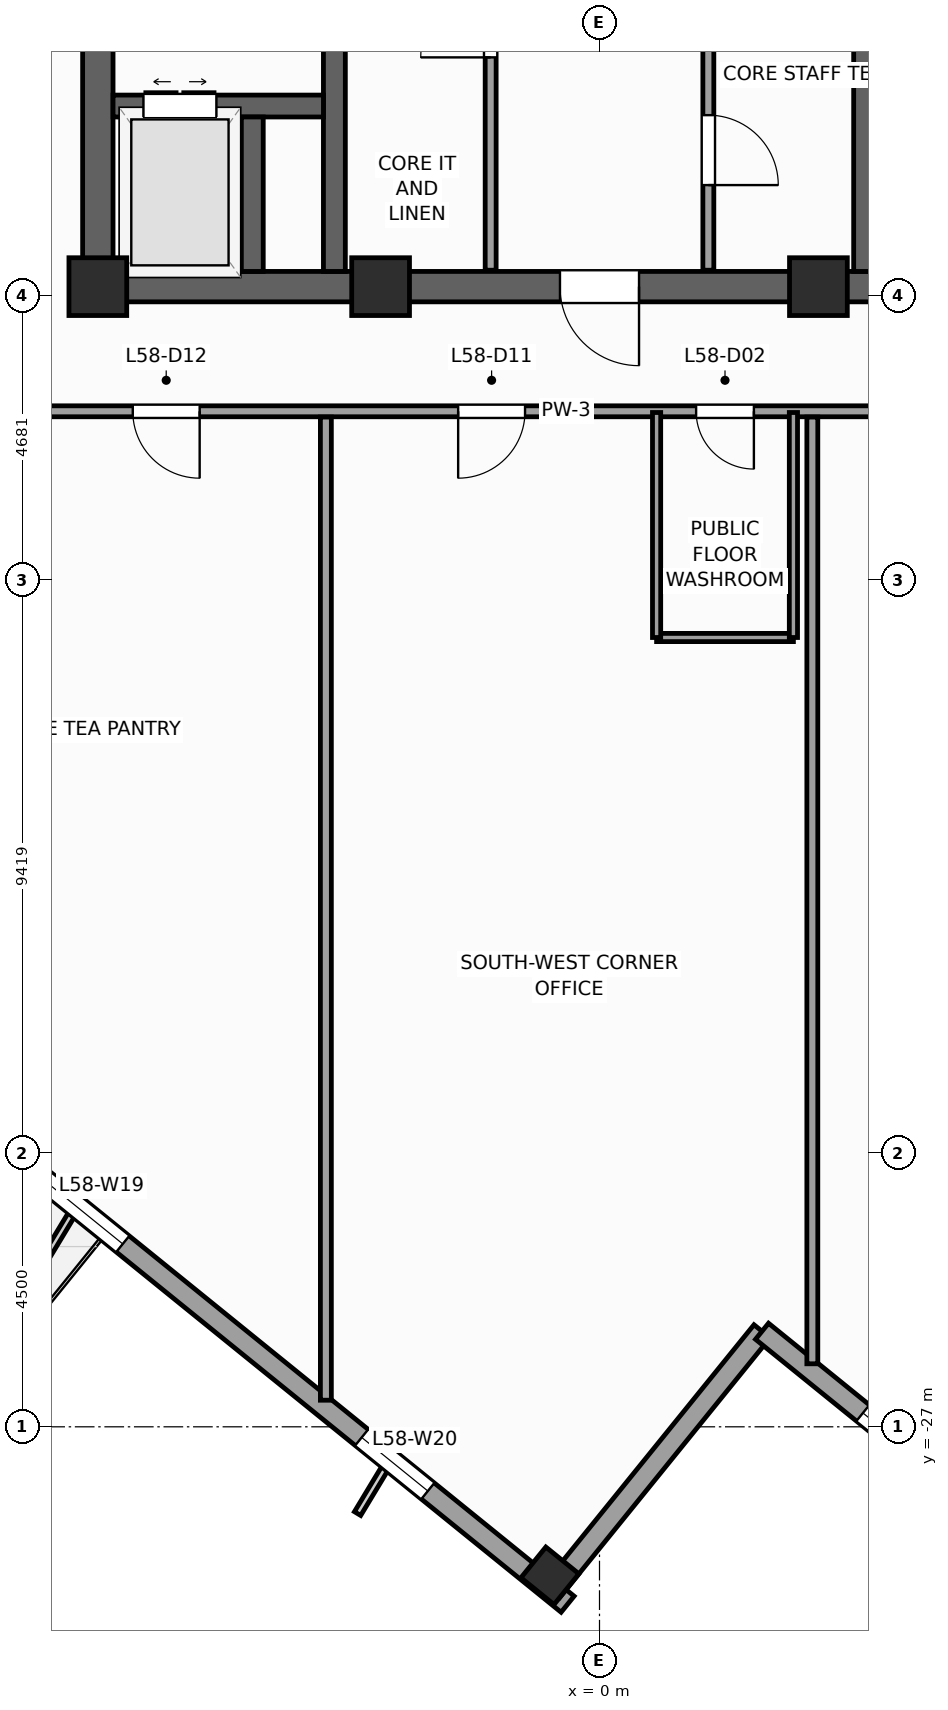
"""IFC4 building model, lengths in metres.
Left out: names, types, materials, properties, quantities, classifications, styles, units other than length and angle.
Written with IfcOpenShell. Run it as: python <this file> out.ifc"""

import sys

from ifc_helpers import new_model, si_unit, direction, frame, frame_2d, origin, origin_2d, place, context, subcontext, project, spatial, rectangle, extrude, source, transform, mapped, element, fill, save


model = new_model("IFC4")
c1 = context("Model", 3, precision=1e-05, world=origin(), true_north=direction((0.0, 1.0)))
c2 = subcontext(c1, "Body", "Model", "MODEL_VIEW")
j1 = project(units=[si_unit("LENGTHUNIT", "METRE"), si_unit("PLANEANGLEUNIT", "RADIAN")], contexts=[c1])
p1 = place(None, origin())
s1 = spatial("IfcSite", under=j1, at=p1, CompositionType="ELEMENT")
p2 = place(p1, origin())
s2 = spatial("IfcBuilding", under=s1, at=p2, CompositionType="ELEMENT")
p3 = place(p2, frame((0.0, 0.0, 240.7)))
s3 = spatial("IfcBuildingStorey", under=s2, at=p3, CompositionType="ELEMENT", Elevation=240.7)
p4 = place(p3, frame((-8.5, -8.25, 0.0), z_axis=(0.0, 0.0, 1.0), x_axis=(1.0, 0.0, 0.0)))
e1 = element("IfcWall", 1, at=p4, inside=s3, PredefinedType="SHEAR", context=c2, shape_type="SweptSolid", body=[
    extrude(rectangle(XDim=17.0, YDim=0.5, at=frame_2d((8.5, 0.0))), origin(), (0.0, 0.0, 1.0), 3.9),
])
p5 = place(p4, frame((7.85, 0.0, 0.0)))
e2 = element("IfcOpeningElement", 2, at=p5, cuts=e1, PredefinedType="OPENING", context=c2, shape_type="SweptSolid", body=[
    extrude(rectangle(XDim=1.3, YDim=2.2, at=frame_2d((0.65, 1.1))), frame((0.0, 0.26, 0.0), z_axis=(0.0, -1.0, 0.0), x_axis=(1.0, 0.0, 0.0)), (0.0, 0.0, 1.0), 0.52),
])
p6 = place(p3, frame((-8.25, -8.0, 0.0), z_axis=(0.0, 0.0, 1.0), x_axis=(0.0, 1.0, 0.0)))
e3 = element("IfcWall", 3, at=p6, inside=s3, PredefinedType="SHEAR", context=c2, shape_type="SweptSolid", body=[
    extrude(rectangle(XDim=16.0, YDim=0.5, at=frame_2d((8.0, 0.0))), origin(), (0.0, 0.0, 1.0), 3.9),
])
p7 = place(p6, frame((4.69, 0.0, 0.0)))
e4 = element("IfcOpeningElement", 4, at=p7, cuts=e3, PredefinedType="OPENING", context=c2, shape_type="SweptSolid", body=[
    extrude(rectangle(XDim=1.3, YDim=2.2, at=frame_2d((0.65, 1.1))), frame((0.0, 0.26, 0.0), z_axis=(0.0, -1.0, 0.0), x_axis=(1.0, 0.0, 0.0)), (0.0, 0.0, 1.0), 0.52),
])
for number, where, z_axis, x_axis in (
    (5, (-4.36, -8.0, 0.0), (0.0, 0.0, 1.0), (0.0, 1.0, 0.0)),
    (6, (4.36, -8.0, 0.0), (0.0, 0.0, 1.0), (0.0, 1.0, 0.0)),
):
    element("IfcWall", number, at=place(p3, frame(where, z_axis=z_axis, x_axis=x_axis)), inside=s3, PredefinedType="SHEAR", context=c2, shape_type="SweptSolid", body=[
        extrude(rectangle(XDim=16.0, YDim=0.36, at=frame_2d((8.0, 0.0))), origin(), (0.0, 0.0, 1.0), 3.9),
    ])
p8 = place(p3, frame((-8.0, -5.28, 0.0), z_axis=(0.0, 0.0, 1.0), x_axis=(1.0, 0.0, 0.0)))
e7 = element("IfcWall", 7, at=p8, inside=s3, PredefinedType="SHEAR", context=c2, shape_type="SweptSolid", body=[
    extrude(rectangle(XDim=3.46, YDim=0.36, at=frame_2d((1.73, 0.0))), origin(), (0.0, 0.0, 1.0), 3.9),
])
p9 = place(p8, frame((0.5, 0.0, 0.0)))
e8 = element("IfcOpeningElement", 8, at=p9, cuts=e7, PredefinedType="OPENING", context=c2, shape_type="SweptSolid", body=[
    extrude(rectangle(XDim=1.2, YDim=2.25, at=frame_2d((0.6, 1.125))), frame((0.0, 0.19, 0.0), z_axis=(0.0, -1.0, 0.0), x_axis=(1.0, 0.0, 0.0)), (0.0, 0.0, 1.0), 0.38),
])
p10 = place(p3, frame((-5.71, -8.0, 0.0), z_axis=(0.0, 0.0, 1.0), x_axis=(0.0, 1.0, 0.0)))
e9 = element("IfcWall", 9, at=p10, inside=s3, PredefinedType="SHEAR", context=c2, shape_type="SweptSolid", body=[
    extrude(rectangle(XDim=2.54, YDim=0.36, at=frame_2d((1.27, 0.0))), origin(), (0.0, 0.0, 1.0), 3.9),
])
m1 = source(origin(), c2, "Body", "SweptSolid", [
    extrude(rectangle(XDim=0.95, YDim=0.95, at=origin_2d()), origin(), (0.0, 0.0, 1.0), 3.9),
])
for number, where, z_axis, x_axis in (
    (10, (-8.25, -8.25, 0.0), (0.0, 0.0, 1.0), (1.0, 0.0, 0.0)),
    (11, (-3.6, -8.25, 0.0), (0.0, 0.0, 1.0), (1.0, 0.0, 0.0)),
    (12, (3.6, -8.25, 0.0), (0.0, 0.0, 1.0), (1.0, 0.0, 0.0)),
):
    element("IfcColumn", number, at=place(p3, frame(where, z_axis=z_axis, x_axis=x_axis)), inside=s3, PredefinedType="PILASTER", context=c2, shape_type="MappedRepresentation", body=[
        mapped(m1, transform((0.0, 0.0, 0.0), scale=1.0)),
    ])
m2 = source(origin(), c2, "Body", "SweptSolid", [
    extrude(rectangle(XDim=0.65, YDim=0.7, at=origin_2d()), origin(), (0.0, 0.0, 1.0), 3.9),
])
p11 = place(p3, frame((-0.815, -29.45, 0.0), z_axis=(0.0, 0.0, 1.0), x_axis=(0.62932039105, 0.777145961457, 0.0)))
e13 = element("IfcColumn", 13, at=p11, inside=s3, PredefinedType="COLUMN", context=c2, shape_type="MappedRepresentation", body=[
    mapped(m2, transform((0.0, 0.0, 0.0), scale=1.0)),
])
p12 = place(p3, frame((-29.154, -6.733, 0.0), z_axis=(0.0, 0.0, 1.0), x_axis=(0.77714192302, -0.629325378072, 0.0)))
e14 = element("IfcWall", 14, at=p12, inside=s3, PredefinedType="STANDARD", context=c2, shape_type="SweptSolid", body=[
    extrude(rectangle(XDim=36.84, YDim=0.34, at=frame_2d((18.42, 0.0))), origin(), (0.0, 0.0, 1.0), 2.96),
])
p13 = place(p12, frame((23.495, 0.0, 0.0)))
e15 = element("IfcOpeningElement", 15, at=p13, cuts=e14, PredefinedType="OPENING", context=c2, shape_type="SweptSolid", body=[
    extrude(rectangle(XDim=1.05, YDim=2.25, at=frame_2d((0.525, 1.125))), frame((0.0, 0.18, 0.0), z_axis=(0.0, -1.0, 0.0), x_axis=(1.0, 0.0, 0.0)), (0.0, 0.0, 1.0), 0.36),
])
p14 = place(p12, frame((3.721, 0.0, 0.48)))
e16 = element("IfcOpeningElement", 16, at=p14, cuts=e14, PredefinedType="OPENING", context=c2, shape_type="SweptSolid", body=[
    extrude(rectangle(XDim=1.4, YDim=2.4, at=frame_2d((0.7, 1.2))), frame((0.0, 0.18, 0.0), z_axis=(0.0, -1.0, 0.0), x_axis=(1.0, 0.0, 0.0)), (0.0, 0.0, 1.0), 0.36),
])
p15 = place(p12, frame((9.809, 0.0, 0.58)))
e17 = element("IfcOpeningElement", 17, at=p15, cuts=e14, PredefinedType="OPENING", context=c2, shape_type="SweptSolid", body=[
    extrude(rectangle(XDim=1.75, YDim=2.3, at=frame_2d((0.875, 1.15))), frame((0.0, 0.18, 0.0), z_axis=(0.0, -1.0, 0.0), x_axis=(1.0, 0.0, 0.0)), (0.0, 0.0, 1.0), 0.36),
])
p16 = place(p12, frame((16.058, 0.0, 0.58)))
e18 = element("IfcOpeningElement", 18, at=p16, cuts=e14, PredefinedType="OPENING", context=c2, shape_type="SweptSolid", body=[
    extrude(rectangle(XDim=1.75, YDim=2.3, at=frame_2d((0.875, 1.15))), frame((0.0, 0.18, 0.0), z_axis=(0.0, -1.0, 0.0), x_axis=(1.0, 0.0, 0.0)), (0.0, 0.0, 1.0), 0.36),
])
p17 = place(p12, frame((25.676, 0.0, 0.58)))
e19 = element("IfcOpeningElement", 19, at=p17, cuts=e14, PredefinedType="OPENING", context=c2, shape_type="SweptSolid", body=[
    extrude(rectangle(XDim=1.75, YDim=2.3, at=frame_2d((0.875, 1.15))), frame((0.0, 0.18, 0.0), z_axis=(0.0, -1.0, 0.0), x_axis=(1.0, 0.0, 0.0)), (0.0, 0.0, 1.0), 0.36),
])
p18 = place(p12, frame((32.482, 0.0, 0.48)))
e20 = element("IfcOpeningElement", 20, at=p18, cuts=e14, PredefinedType="OPENING", context=c2, shape_type="SweptSolid", body=[
    extrude(rectangle(XDim=1.4, YDim=2.4, at=frame_2d((0.7, 1.2))), frame((0.0, 0.18, 0.0), z_axis=(0.0, -1.0, 0.0), x_axis=(1.0, 0.0, 0.0)), (0.0, 0.0, 1.0), 0.36),
])
p19 = place(p3, frame((-0.789, -29.703, 0.0), z_axis=(0.0, 0.0, 1.0), x_axis=(0.629323365087, 0.77714355312, 0.0)))
e21 = element("IfcWall", 21, at=p19, inside=s3, PredefinedType="STANDARD", context=c2, shape_type="SweptSolid", body=[
    extrude(rectangle(XDim=5.5, YDim=0.34, at=frame_2d((2.75, 0.0))), origin(), (0.0, 0.0, 1.0), 3.66),
])
p20 = place(p3, frame((2.673, -25.429, 0.0), z_axis=(0.0, 0.0, 1.0), x_axis=(0.777162640055, -0.629299794138, 0.0)))
e22 = element("IfcWall", 22, at=p20, inside=s3, PredefinedType="STANDARD", context=c2, shape_type="SweptSolid", body=[
    extrude(rectangle(XDim=5.67, YDim=0.34, at=frame_2d((2.835, 0.0))), origin(), (0.0, 0.0, 1.0), 3.66),
])
p21 = place(p20, frame((2.135, 0.0, 0.48)))
e23 = element("IfcOpeningElement", 23, at=p21, cuts=e22, PredefinedType="OPENING", context=c2, shape_type="SweptSolid", body=[
    extrude(rectangle(XDim=1.4, YDim=2.4, at=frame_2d((0.7, 1.2))), frame((0.0, 0.18, 0.0), z_axis=(0.0, -1.0, 0.0), x_axis=(1.0, 0.0, 0.0)), (0.0, 0.0, 1.0), 0.36),
])
p22 = place(p3, frame((-1.79, -7.98, 0.0), z_axis=(0.0, 0.0, 1.0), x_axis=(0.0, 1.0, 0.0)))
e24 = element("IfcWall", 24, at=p22, inside=s3, PredefinedType="PARTITIONING", context=c2, shape_type="SweptSolid", body=[
    extrude(rectangle(XDim=12.38, YDim=0.18, at=frame_2d((6.19, 0.0))), origin(), (0.0, 0.0, 1.0), 3.66),
])
p23 = place(p22, frame((8.8, 0.0, 0.0)))
e25 = element("IfcOpeningElement", 25, at=p23, cuts=e24, PredefinedType="OPENING", context=c2, shape_type="SweptSolid", body=[
    extrude(rectangle(XDim=1.1, YDim=2.2, at=frame_2d((0.55, 1.1))), frame((0.0, 0.1, 0.0), z_axis=(0.0, -1.0, 0.0), x_axis=(1.0, 0.0, 0.0)), (0.0, 0.0, 1.0), 0.2),
])
p24 = place(p22, frame((10.86, 0.0, 0.0)))
e26 = element("IfcOpeningElement", 26, at=p24, cuts=e24, PredefinedType="OPENING", context=c2, shape_type="SweptSolid", body=[
    extrude(rectangle(XDim=1.1, YDim=2.2, at=frame_2d((0.55, 1.1))), frame((0.0, 0.1, 0.0), z_axis=(0.0, -1.0, 0.0), x_axis=(1.0, 0.0, 0.0)), (0.0, 0.0, 1.0), 0.2),
])
p25 = place(p22, frame((3.5, 0.0, 0.0)))
e27 = element("IfcOpeningElement", 27, at=p25, cuts=e24, PredefinedType="OPENING", context=c2, shape_type="SweptSolid", body=[
    extrude(rectangle(XDim=1.15, YDim=2.25, at=frame_2d((0.575, 1.125))), frame((0.0, 0.1, 0.0), z_axis=(0.0, -1.0, 0.0), x_axis=(1.0, 0.0, 0.0)), (0.0, 0.0, 1.0), 0.2),
])
p26 = place(p3, frame((1.79, -7.98, 0.0), z_axis=(0.0, 0.0, 1.0), x_axis=(0.0, 1.0, 0.0)))
e28 = element("IfcWall", 28, at=p26, inside=s3, PredefinedType="PARTITIONING", context=c2, shape_type="SweptSolid", body=[
    extrude(rectangle(XDim=12.38, YDim=0.18, at=frame_2d((6.19, 0.0))), origin(), (0.0, 0.0, 1.0), 3.66),
])
p27 = place(p26, frame((8.8, 0.0, 0.0)))
e29 = element("IfcOpeningElement", 29, at=p27, cuts=e28, PredefinedType="OPENING", context=c2, shape_type="SweptSolid", body=[
    extrude(rectangle(XDim=1.1, YDim=2.2, at=frame_2d((0.55, 1.1))), frame((0.0, 0.1, 0.0), z_axis=(0.0, -1.0, 0.0), x_axis=(1.0, 0.0, 0.0)), (0.0, 0.0, 1.0), 0.2),
])
p28 = place(p26, frame((10.86, 0.0, 0.0)))
e30 = element("IfcOpeningElement", 30, at=p28, cuts=e28, PredefinedType="OPENING", context=c2, shape_type="SweptSolid", body=[
    extrude(rectangle(XDim=1.1, YDim=2.2, at=frame_2d((0.55, 1.1))), frame((0.0, 0.1, 0.0), z_axis=(0.0, -1.0, 0.0), x_axis=(1.0, 0.0, 0.0)), (0.0, 0.0, 1.0), 0.2),
])
p29 = place(p26, frame((1.4, 0.0, 0.0)))
e31 = element("IfcOpeningElement", 31, at=p29, cuts=e28, PredefinedType="OPENING", context=c2, shape_type="SweptSolid", body=[
    extrude(rectangle(XDim=1.15, YDim=2.25, at=frame_2d((0.575, 1.125))), frame((0.0, 0.1, 0.0), z_axis=(0.0, -1.0, 0.0), x_axis=(1.0, 0.0, 0.0)), (0.0, 0.0, 1.0), 0.2),
])
p30 = place(p26, frame((5.6, 0.0, 0.0)))
e32 = element("IfcOpeningElement", 32, at=p30, cuts=e28, PredefinedType="OPENING", context=c2, shape_type="SweptSolid", body=[
    extrude(rectangle(XDim=1.15, YDim=2.25, at=frame_2d((0.575, 1.125))), frame((0.0, 0.1, 0.0), z_axis=(0.0, -1.0, 0.0), x_axis=(1.0, 0.0, 0.0)), (0.0, 0.0, 1.0), 0.2),
])
p31 = place(p3, frame((-11.4, -10.3, 0.0), z_axis=(0.0, 0.0, 1.0), x_axis=(1.0, 0.0, 0.0)))
e33 = element("IfcWall", 33, at=p31, inside=s3, PredefinedType="PARTITIONING", context=c2, shape_type="SweptSolid", body=[
    extrude(rectangle(XDim=21.7, YDim=0.18, at=frame_2d((10.85, 0.0))), origin(), (0.0, 0.0, 1.0), 3.66),
])
p32 = place(p31, frame((12.989, 0.0, 0.0)))
e34 = element("IfcOpeningElement", 34, at=p32, cuts=e33, PredefinedType="OPENING", context=c2, shape_type="SweptSolid", body=[
    extrude(rectangle(XDim=0.95, YDim=2.1, at=frame_2d((0.475, 1.05))), frame((0.0, 0.1, 0.0), z_axis=(0.0, -1.0, 0.0), x_axis=(1.0, 0.0, 0.0)), (0.0, 0.0, 1.0), 0.2),
])
p33 = place(p31, frame((17.585, 0.0, 0.0)))
e35 = element("IfcOpeningElement", 35, at=p33, cuts=e33, PredefinedType="OPENING", context=c2, shape_type="SweptSolid", body=[
    extrude(rectangle(XDim=1.1, YDim=2.2, at=frame_2d((0.55, 1.1))), frame((0.0, 0.1, 0.0), z_axis=(0.0, -1.0, 0.0), x_axis=(1.0, 0.0, 0.0)), (0.0, 0.0, 1.0), 0.2),
])
p34 = place(p31, frame((9.075, 0.0, 0.0)))
e36 = element("IfcOpeningElement", 36, at=p34, cuts=e33, PredefinedType="OPENING", context=c2, shape_type="SweptSolid", body=[
    extrude(rectangle(XDim=1.1, YDim=2.2, at=frame_2d((0.55, 1.1))), frame((0.0, 0.1, 0.0), z_axis=(0.0, -1.0, 0.0), x_axis=(1.0, 0.0, 0.0)), (0.0, 0.0, 1.0), 0.2),
])
p35 = place(p31, frame((3.724, 0.0, 0.0)))
e37 = element("IfcOpeningElement", 37, at=p35, cuts=e33, PredefinedType="OPENING", context=c2, shape_type="SweptSolid", body=[
    extrude(rectangle(XDim=1.1, YDim=2.2, at=frame_2d((0.55, 1.1))), frame((0.0, 0.1, 0.0), z_axis=(0.0, -1.0, 0.0), x_axis=(1.0, 0.0, 0.0)), (0.0, 0.0, 1.0), 0.2),
])
p36 = place(p3, frame((3.5, -10.395, 0.0), z_axis=(0.0, 0.0, 1.0), x_axis=(0.0, -1.0, 0.0)))
e38 = element("IfcWall", 38, at=p36, inside=s3, PredefinedType="PARTITIONING", context=c2, shape_type="SweptSolid", body=[
    extrude(rectangle(XDim=15.569, YDim=0.18, at=frame_2d((7.784, 0.0))), origin(), (0.0, 0.0, 1.0), 3.66),
])
p37 = place(p3, frame((-4.5, -10.395, 0.0), z_axis=(0.0, 0.0, 1.0), x_axis=(0.0, -1.0, 0.0)))
e39 = element("IfcWall", 39, at=p37, inside=s3, PredefinedType="PARTITIONING", context=c2, shape_type="SweptSolid", body=[
    extrude(rectangle(XDim=16.168, YDim=0.18, at=frame_2d((8.084, 0.0))), origin(), (0.0, 0.0, 1.0), 3.66),
])
p38 = place(p3, frame((0.939, -14.02, 0.0), z_axis=(0.0, 0.0, 1.0), x_axis=(1.0, 0.0, 0.0)))
e40 = element("IfcWall", 40, at=p38, inside=s3, PredefinedType="PARTITIONING", context=c2, shape_type="SweptSolid", body=[
    extrude(rectangle(XDim=2.25, YDim=0.135, at=frame_2d((1.125, 0.0))), origin(), (0.0, 0.0, 1.0), 3.66),
])
for number, where, z_axis, x_axis in (
    (41, (3.189, -14.02, 0.0), (0.0, 0.0, 1.0), (0.0, 1.0, 0.0)),
    (42, (0.939, -14.02, 0.0), (0.0, 0.0, 1.0), (0.0, 1.0, 0.0)),
):
    element("IfcWall", number, at=place(p3, frame(where, z_axis=z_axis, x_axis=x_axis)), inside=s3, PredefinedType="PARTITIONING", context=c2, shape_type="SweptSolid", body=[
        extrude(rectangle(XDim=3.7, YDim=0.135, at=frame_2d((1.85, 0.0))), origin(), (0.0, 0.0, 1.0), 3.66),
    ])
m3 = source(origin(), c2, "Body", "SweptSolid", [
    extrude(rectangle(XDim=1.75, YDim=2.3, at=frame_2d((0.875, 1.15))), frame((0.0, 0.03, 0.0), z_axis=(0.0, -1.0, 0.0), x_axis=(1.0, 0.0, 0.0)), (0.0, 0.0, 1.0), 0.06),
])
p39 = place(p17, origin())
e43 = element("IfcWindow", 43, at=p39, inside=s3, PartitioningType="SINGLE_PANEL", PredefinedType="WINDOW", context=c2, shape_type="MappedRepresentation", body=[
    mapped(m3, transform((0.0, 0.0, 0.0), scale=1.0)),
])
fill(e19, e43)
m4 = source(origin(), c2, "Body", "SweptSolid", [
    extrude(rectangle(XDim=1.4, YDim=2.4, at=frame_2d((0.7, 1.2))), frame((0.0, 0.03, 0.0), z_axis=(0.0, -1.0, 0.0), x_axis=(1.0, 0.0, 0.0)), (0.0, 0.0, 1.0), 0.06),
])
p40 = place(p18, origin())
e44 = element("IfcWindow", 44, at=p40, inside=s3, PartitioningType="SINGLE_PANEL", PredefinedType="WINDOW", context=c2, shape_type="MappedRepresentation", body=[
    mapped(m4, transform((0.0, 0.0, 0.0), scale=1.0)),
])
fill(e20, e44)
p41 = place(p21, origin())
e45 = element("IfcWindow", 45, at=p41, inside=s3, PartitioningType="SINGLE_PANEL", PredefinedType="WINDOW", context=c2, shape_type="MappedRepresentation", body=[
    mapped(m4, transform((0.0, 0.0, 0.0), scale=1.0)),
])
fill(e23, e45)
m5 = source(origin(), c2, "Body", "SweptSolid", [
    extrude(rectangle(XDim=1.3, YDim=2.2, at=frame_2d((0.65, 1.1))), frame((0.0, 0.025, 0.0), z_axis=(0.0, -1.0, 0.0), x_axis=(1.0, 0.0, 0.0)), (0.0, 0.0, 1.0), 0.05),
])
p42 = place(p5, frame((1.3, 0.0, 0.0), z_axis=(0.0, 0.0, 1.0), x_axis=(-1.0, 0.0, 0.0)))
e46 = element("IfcDoor", 46, at=p42, inside=s3, OperationType="SINGLE_SWING_RIGHT", PredefinedType="DOOR", context=c2, shape_type="MappedRepresentation", body=[
    mapped(m5, transform((0.0, 0.0, 0.0), scale=1.0)),
])
fill(e2, e46)
m6 = source(origin(), c2, "Body", "SweptSolid", [
    extrude(rectangle(XDim=1.2, YDim=2.25, at=frame_2d((0.6, 1.125))), frame((0.0, 0.025, 0.0), z_axis=(0.0, -1.0, 0.0), x_axis=(1.0, 0.0, 0.0)), (0.0, 0.0, 1.0), 0.05),
])
p43 = place(p9, origin())
e47 = element("IfcDoor", 47, at=p43, inside=s3, OperationType="DOUBLE_DOOR_SLIDING", PredefinedType="DOOR", context=c2, shape_type="MappedRepresentation", body=[
    mapped(m6, transform((0.0, 0.0, 0.0), scale=1.0)),
])
fill(e8, e47)
m7 = source(origin(), c2, "Body", "SweptSolid", [
    extrude(rectangle(XDim=1.15, YDim=2.25, at=frame_2d((0.575, 1.125))), frame((0.0, 0.025, 0.0), z_axis=(0.0, -1.0, 0.0), x_axis=(1.0, 0.0, 0.0)), (0.0, 0.0, 1.0), 0.05),
])
p44 = place(p25, origin())
e48 = element("IfcDoor", 48, at=p44, inside=s3, OperationType="SINGLE_SWING_LEFT", PredefinedType="DOOR", context=c2, shape_type="MappedRepresentation", body=[
    mapped(m7, transform((0.0, 0.0, 0.0), scale=1.0)),
])
fill(e27, e48)
p45 = place(p29, frame((1.15, 0.0, 0.0), z_axis=(0.0, 0.0, 1.0), x_axis=(-1.0, 0.0, 0.0)))
e49 = element("IfcDoor", 49, at=p45, inside=s3, OperationType="SINGLE_SWING_LEFT", PredefinedType="DOOR", context=c2, shape_type="MappedRepresentation", body=[
    mapped(m7, transform((0.0, 0.0, 0.0), scale=1.0)),
])
fill(e31, e49)
m8 = source(origin(), c2, "Body", "SweptSolid", [
    extrude(rectangle(XDim=0.95, YDim=2.1, at=frame_2d((0.475, 1.05))), frame((0.0, 0.025, 0.0), z_axis=(0.0, -1.0, 0.0), x_axis=(1.0, 0.0, 0.0)), (0.0, 0.0, 1.0), 0.05),
])
p46 = place(p32, frame((0.95, 0.0, 0.0), z_axis=(0.0, 0.0, 1.0), x_axis=(-1.0, 0.0, 0.0)))
e50 = element("IfcDoor", 50, at=p46, inside=s3, OperationType="SINGLE_SWING_RIGHT", PredefinedType="DOOR", context=c2, shape_type="MappedRepresentation", body=[
    mapped(m8, transform((0.0, 0.0, 0.0), scale=1.0)),
])
fill(e34, e50)
m9 = source(origin(), c2, "Body", "SweptSolid", [
    extrude(rectangle(XDim=1.1, YDim=2.2, at=frame_2d((0.55, 1.1))), frame((0.0, 0.025, 0.0), z_axis=(0.0, -1.0, 0.0), x_axis=(1.0, 0.0, 0.0)), (0.0, 0.0, 1.0), 0.05),
])
p47 = place(p34, frame((1.1, 0.0, 0.0), z_axis=(0.0, 0.0, 1.0), x_axis=(-1.0, 0.0, 0.0)))
e51 = element("IfcDoor", 51, at=p47, inside=s3, OperationType="SINGLE_SWING_LEFT", PredefinedType="DOOR", context=c2, shape_type="MappedRepresentation", body=[
    mapped(m9, transform((0.0, 0.0, 0.0), scale=1.0)),
])
fill(e36, e51)
p48 = place(p35, frame((1.1, 0.0, 0.0), z_axis=(0.0, 0.0, 1.0), x_axis=(-1.0, 0.0, 0.0)))
e52 = element("IfcDoor", 52, at=p48, inside=s3, OperationType="SINGLE_SWING_RIGHT", PredefinedType="DOOR", context=c2, shape_type="MappedRepresentation", body=[
    mapped(m9, transform((0.0, 0.0, 0.0), scale=1.0)),
])
fill(e37, e52)
save(model, sys.argv[1])
